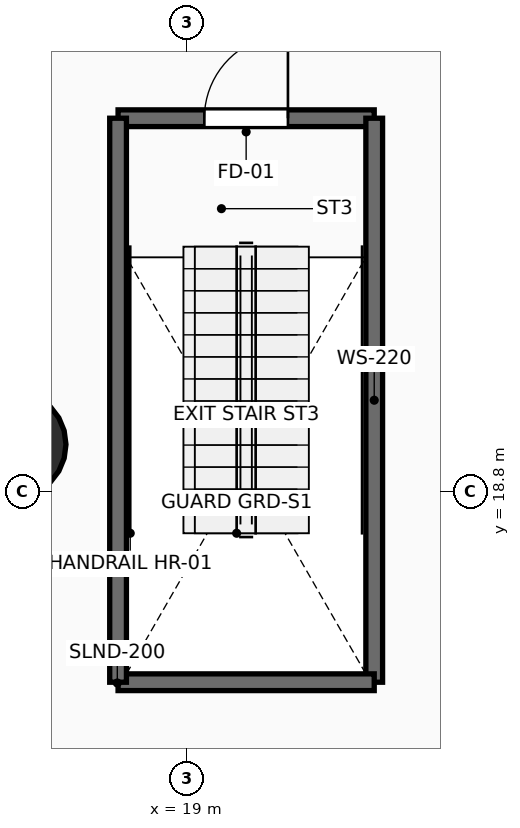
"""IFC4 building model, lengths in metres.
Left out: names, types, materials, properties, quantities, classifications, styles, units other than length and angle.
Written with IfcOpenShell. Run it as: python <this file> out.ifc"""

import sys

from ifc_helpers import new_model, si_unit, direction, frame, frame_2d, origin, origin_2d, place, context, subcontext, project, spatial, rectangle, circle, extrude, element, fill, save


model = new_model("IFC4")
c1 = context("Model", 3, precision=1e-05, world=origin(), true_north=direction((0.0, 1.0)))
c2 = subcontext(c1, "Body", "Model", "MODEL_VIEW")
j1 = project(units=[si_unit("LENGTHUNIT", "METRE"), si_unit("PLANEANGLEUNIT", "RADIAN")], contexts=[c1])
p1 = place(None, origin())
s1 = spatial("IfcSite", under=j1, at=p1, CompositionType="ELEMENT")
p2 = place(p1, origin())
s2 = spatial("IfcBuilding", under=s1, at=p2, CompositionType="ELEMENT")
p3 = place(p2, frame((0.0, 0.0, 9.6)))
s3 = spatial("IfcBuildingStorey", under=s2, at=p3, CompositionType="ELEMENT", Elevation=9.6)
p4 = place(p3, frame((16.705, 19.418, 0.0), z_axis=(0.0, 0.0, 1.0), x_axis=(-0.923879532511, -0.382683432365, 0.0)))
e1 = element("IfcColumn", 1, at=p4, inside=s3, PredefinedType="COLUMN", context=c2, shape_type="SweptSolid", body=[
    extrude(circle(Radius=0.7, at=origin_2d()), origin(), (0.0, 0.0, 1.0), 4.8),
])
p5 = place(p3, frame((18.09, 23.71, 0.0), z_axis=(0.0, 0.0, 1.0), x_axis=(1.0, 0.0, 0.0)))
e2 = element("IfcWall", 2, at=p5, inside=s3, PredefinedType="SOLIDWALL", context=c2, shape_type="SweptSolid", body=[
    extrude(rectangle(XDim=3.37, YDim=0.22, at=frame_2d((1.685, 0.0))), origin(), (0.0, 0.0, 1.0), 4.48),
])
p6 = place(p5, frame((1.135, 0.0, 0.0)))
e3 = element("IfcOpeningElement", 3, at=p6, cuts=e2, PredefinedType="OPENING", context=c2, shape_type="SweptSolid", body=[
    extrude(rectangle(XDim=1.1, YDim=2.15, at=frame_2d((0.55, 1.075))), frame((0.0, 0.125, 0.0), z_axis=(0.0, -1.0, 0.0), x_axis=(1.0, 0.0, 0.0)), (0.0, 0.0, 1.0), 0.25),
])
p7 = place(p3, frame((21.46, 23.71, 0.0), z_axis=(0.0, 0.0, 1.0), x_axis=(0.0, -1.0, 0.0)))
e4 = element("IfcWall", 4, at=p7, inside=s3, PredefinedType="SOLIDWALL", context=c2, shape_type="SweptSolid", body=[
    extrude(rectangle(XDim=7.42, YDim=0.22, at=frame_2d((3.71, 0.0))), origin(), (0.0, 0.0, 1.0), 4.48),
])
p8 = place(p3, frame((21.46, 16.29, 0.0), z_axis=(0.0, 0.0, 1.0), x_axis=(-1.0, 0.0, 0.0)))
e5 = element("IfcWall", 5, at=p8, inside=s3, PredefinedType="SOLIDWALL", context=c2, shape_type="SweptSolid", body=[
    extrude(rectangle(XDim=3.37, YDim=0.22, at=frame_2d((1.685, 0.0))), origin(), (0.0, 0.0, 1.0), 4.48),
])
p9 = place(p3, frame((18.09, 16.29, 0.0), z_axis=(0.0, 0.0, 1.0), x_axis=(0.0, 1.0, 0.0)))
e6 = element("IfcWall", 6, at=p9, inside=s3, PredefinedType="SOLIDWALL", context=c2, shape_type="SweptSolid", body=[
    extrude(rectangle(XDim=7.42, YDim=0.22, at=frame_2d((3.71, 0.0))), origin(), (0.0, 0.0, 1.0), 4.48),
])
p10 = place(p6, origin())
e7 = element("IfcDoor", 7, at=p10, inside=s3, OperationType="SINGLE_SWING_RIGHT", PredefinedType="DOOR", context=c2, shape_type="SweptSolid", body=[
    extrude(rectangle(XDim=1.1, YDim=2.15, at=frame_2d((0.55, 1.075))), frame((0.0, 0.025, 0.0), z_axis=(0.0, -1.0, 0.0), x_axis=(1.0, 0.0, 0.0)), (0.0, 0.0, 1.0), 0.05),
])
fill(e3, e7)
save(model, sys.argv[1])
